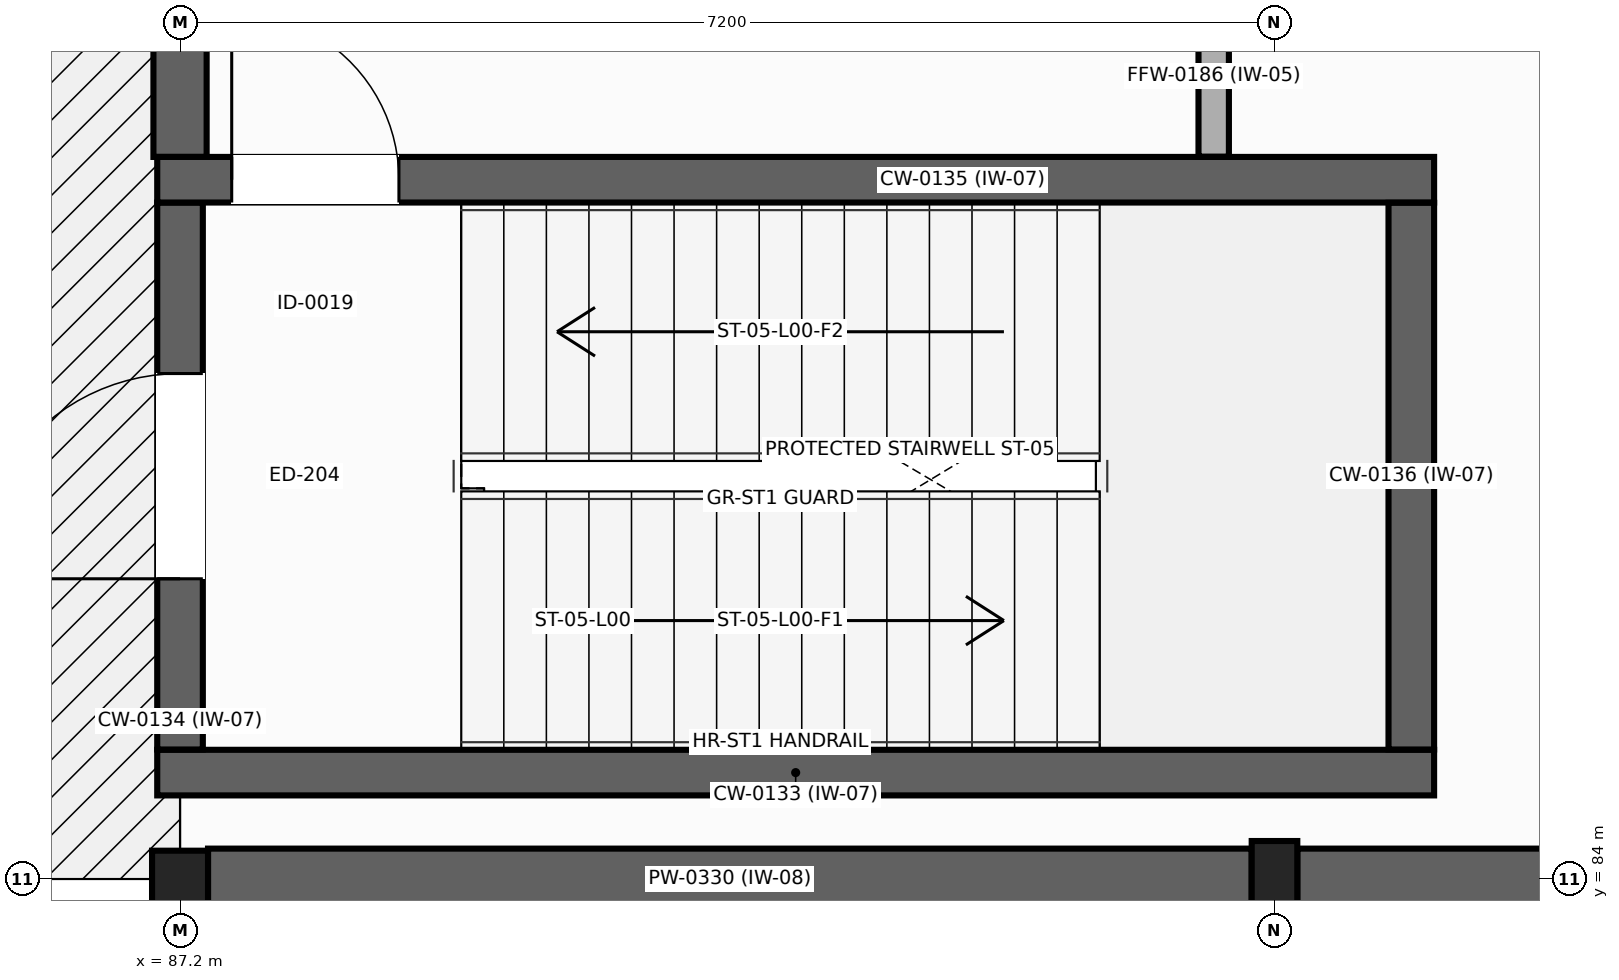
"""IFC4 building model, lengths in metres.
Left out: names, types, materials, properties, quantities, classifications, styles, units other than length and angle.
Written with IfcOpenShell. Run it as: python <this file> out.ifc"""

import sys

from ifc_helpers import new_model, si_unit, direction, frame, frame_2d, origin, origin_2d, place, context, subcontext, project, spatial, rectangle, i_section, extrude, element, fill, save


model = new_model("IFC4")
c1 = context("Model", 3, precision=1e-05, world=origin(), true_north=direction((0.0, 1.0)))
c2 = subcontext(c1, "Body", "Model", "MODEL_VIEW")
j1 = project(units=[si_unit("LENGTHUNIT", "METRE"), si_unit("PLANEANGLEUNIT", "RADIAN")], contexts=[c1])
p1 = place(None, origin())
s1 = spatial("IfcSite", under=j1, at=p1, CompositionType="ELEMENT")
p2 = place(p1, origin())
s2 = spatial("IfcBuilding", under=s1, at=p2, CompositionType="ELEMENT")
p3 = place(p2, origin())
s3 = spatial("IfcBuildingStorey", under=s2, at=p3, CompositionType="ELEMENT", Elevation=0.0)
p4 = place(p3, frame((87.2, 84.0, 0.0), z_axis=(0.0, 0.0, 1.0), x_axis=(0.0, 1.0, 0.0)))
e1 = element("IfcColumn", 1, at=p4, inside=s3, PredefinedType="COLUMN", context=c2, shape_type="SweptSolid", body=[
    extrude(i_section(OverallWidth=0.373, OverallDepth=0.368, WebThickness=0.014, FlangeThickness=0.024, at=origin_2d()), origin(), (0.0, 0.0, 1.0), 5.4),
])
p5 = place(p3, frame((94.4, 84.0, 0.0), z_axis=(0.0, 0.0, 1.0), x_axis=(1.0, 0.0, 0.0)))
e2 = element("IfcColumn", 2, at=p5, inside=s3, PredefinedType="COLUMN", context=c2, shape_type="SweptSolid", body=[
    extrude(i_section(OverallWidth=0.3, OverallDepth=0.5, WebThickness=0.014, FlangeThickness=0.028, at=origin_2d()), origin(), (0.0, 0.0, 1.0), 5.4),
])
p6 = place(p3, frame((87.2, 88.75, 0.0), z_axis=(0.0, 0.0, 1.0), x_axis=(0.0, 1.0, 0.0)))
e3 = element("IfcWall", 3, at=p6, inside=s3, PredefinedType="SOLIDWALL", context=c2, shape_type="SweptSolid", body=[
    extrude(rectangle(XDim=2.2, YDim=0.35, at=frame_2d((1.1, 0.0))), origin(), (0.0, 0.0, 1.0), 5.15),
])
p7 = place(p3, frame((95.45, 84.7, 0.0), z_axis=(0.0, 0.0, 1.0), x_axis=(-1.0, 0.0, 0.0)))
e4 = element("IfcWall", 4, at=p7, inside=s3, PredefinedType="SHEAR", context=c2, shape_type="SweptSolid", body=[
    extrude(rectangle(XDim=8.4, YDim=0.3, at=frame_2d((4.2, 0.0))), origin(), (0.0, 0.0, 1.0), 5.15),
])
p8 = place(p3, frame((87.2, 84.852, 0.0), z_axis=(0.0, 0.0, 1.0), x_axis=(0.0, 1.0, 0.0)))
e5 = element("IfcWall", 5, at=p8, inside=s3, PredefinedType="SHEAR", context=c2, shape_type="SweptSolid", body=[
    extrude(rectangle(XDim=3.598, YDim=0.3, at=frame_2d((1.799, 0.0))), origin(), (0.0, 0.0, 1.0), 5.15),
])
p9 = place(p8, frame((1.123, 0.0, 0.0)))
e6 = element("IfcOpeningElement", 6, at=p9, cuts=e5, PredefinedType="OPENING", context=c2, shape_type="SweptSolid", body=[
    extrude(rectangle(XDim=1.35, YDim=2.2, at=frame_2d((0.675, 1.1))), frame((0.0, 0.16, 0.0), z_axis=(0.0, -1.0, 0.0), x_axis=(1.0, 0.0, 0.0)), (0.0, 0.0, 1.0), 0.32),
])
p10 = place(p3, frame((87.05, 88.6, 0.0), z_axis=(0.0, 0.0, 1.0), x_axis=(1.0, 0.0, 0.0)))
e7 = element("IfcWall", 7, at=p10, inside=s3, PredefinedType="SHEAR", context=c2, shape_type="SweptSolid", body=[
    extrude(rectangle(XDim=8.4, YDim=0.3, at=frame_2d((4.2, 0.0))), origin(), (0.0, 0.0, 1.0), 5.15),
])
p11 = place(p10, frame((0.49, 0.0, 0.0)))
e8 = element("IfcOpeningElement", 8, at=p11, cuts=e7, PredefinedType="OPENING", context=c2, shape_type="SweptSolid", body=[
    extrude(rectangle(XDim=1.1, YDim=2.15, at=frame_2d((0.55, 1.075))), frame((0.0, 0.16, 0.0), z_axis=(0.0, -1.0, 0.0), x_axis=(1.0, 0.0, 0.0)), (0.0, 0.0, 1.0), 0.32),
])
p12 = place(p3, frame((95.3, 88.448, 0.0), z_axis=(0.0, 0.0, 1.0), x_axis=(0.0, -1.0, 0.0)))
e9 = element("IfcWall", 9, at=p12, inside=s3, PredefinedType="SHEAR", context=c2, shape_type="SweptSolid", body=[
    extrude(rectangle(XDim=3.596, YDim=0.3, at=frame_2d((1.798, 0.0))), origin(), (0.0, 0.0, 1.0), 5.15),
])
p13 = place(p3, frame((94.0, 93.298, 0.0), z_axis=(0.0, 0.0, 1.0), x_axis=(0.0, -1.0, 0.0)))
e10 = element("IfcWall", 10, at=p13, inside=s3, PredefinedType="PARTITIONING", context=c2, shape_type="SweptSolid", body=[
    extrude(rectangle(XDim=4.546, YDim=0.2, at=frame_2d((2.273, 0.0))), origin(), (0.0, 0.0, 1.0), 5.15),
])
p14 = place(p13, frame((1.698, 0.0, 0.0)))
e11 = element("IfcOpeningElement", 11, at=p14, cuts=e10, PredefinedType="OPENING", context=c2, shape_type="SweptSolid", body=[
    extrude(rectangle(XDim=1.15, YDim=2.15, at=frame_2d((0.575, 1.075))), frame((0.0, 0.11, 0.0), z_axis=(0.0, -1.0, 0.0), x_axis=(1.0, 0.0, 0.0)), (0.0, 0.0, 1.0), 0.22),
])
p15 = place(p3, frame((87.384, 84.0, 0.0), z_axis=(0.0, 0.0, 1.0), x_axis=(1.0, 0.0, 0.0)))
e12 = element("IfcWall", 12, at=p15, inside=s3, PredefinedType="SHEAR", context=c2, shape_type="SweptSolid", body=[
    extrude(rectangle(XDim=6.866, YDim=0.4, at=frame_2d((3.433, 0.0))), origin(), (0.0, 0.0, 1.0), 5.1),
])
p16 = place(p3, frame((94.55, 84.0, 0.0), z_axis=(0.0, 0.0, 1.0), x_axis=(1.0, 0.0, 0.0)))
e13 = element("IfcWall", 13, at=p16, inside=s3, PredefinedType="SHEAR", context=c2, shape_type="SweptSolid", body=[
    extrude(rectangle(XDim=6.8, YDim=0.4, at=frame_2d((3.4, 0.0))), origin(), (0.0, 0.0, 1.0), 5.15),
])
p17 = place(p9, origin())
e14 = element("IfcDoor", 14, at=p17, inside=s3, OperationType="SINGLE_SWING_LEFT", PredefinedType="DOOR", context=c2, shape_type="SweptSolid", body=[
    extrude(rectangle(XDim=1.35, YDim=2.2, at=frame_2d((0.675, 1.1))), frame((0.0, 0.025, 0.0), z_axis=(0.0, -1.0, 0.0), x_axis=(1.0, 0.0, 0.0)), (0.0, 0.0, 1.0), 0.05),
])
fill(e6, e14)
p18 = place(p11, origin())
e15 = element("IfcDoor", 15, at=p18, inside=s3, OperationType="SINGLE_SWING_LEFT", PredefinedType="DOOR", context=c2, shape_type="SweptSolid", body=[
    extrude(rectangle(XDim=1.1, YDim=2.15, at=frame_2d((0.55, 1.075))), frame((0.0, 0.025, 0.0), z_axis=(0.0, -1.0, 0.0), x_axis=(1.0, 0.0, 0.0)), (0.0, 0.0, 1.0), 0.05),
])
fill(e8, e15)
save(model, sys.argv[1])
